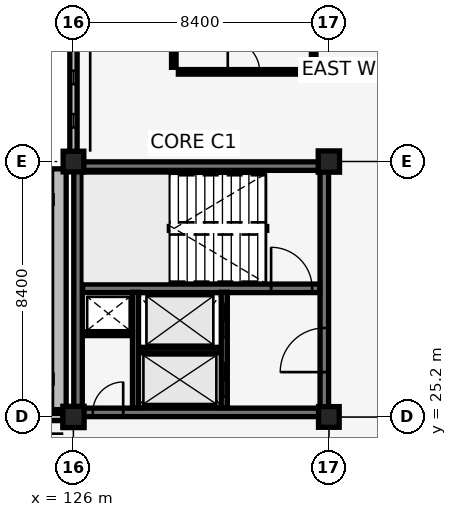
"""IFC4 building model, lengths in metres.
Left out: names, types, materials, properties, quantities, classifications, styles, units other than length and angle.
Written with IfcOpenShell. Run it as: python <this file> out.ifc"""

import sys

from ifc_helpers import new_model, si_unit, direction, frame, frame_2d, origin, origin_2d, place, context, subcontext, project, spatial, rectangle, extrude, element, fill, save


model = new_model("IFC4")
c1 = context("Model", 3, precision=1e-05, world=origin(), true_north=direction((0.0, 1.0)))
c2 = subcontext(c1, "Body", "Model", "MODEL_VIEW")
j1 = project(units=[si_unit("LENGTHUNIT", "METRE"), si_unit("PLANEANGLEUNIT", "RADIAN")], contexts=[c1])
p1 = place(None, origin())
s1 = spatial("IfcSite", under=j1, at=p1, CompositionType="ELEMENT")
p2 = place(p1, origin())
s2 = spatial("IfcBuilding", under=s1, at=p2, CompositionType="ELEMENT")
p3 = place(p2, frame((0.0, 0.0, 9.86)))
s3 = spatial("IfcBuildingStorey", under=s2, at=p3, CompositionType="ELEMENT", Elevation=9.86)
p4 = place(p3, frame((126.15, 25.35, 0.0), z_axis=(0.0, 0.0, 1.0), x_axis=(1.0, 0.0, 0.0)))
e1 = element("IfcWall", 1, at=p4, inside=s3, PredefinedType="SHEAR", context=c2, shape_type="SweptSolid", body=[
    extrude(rectangle(XDim=8.1, YDim=0.28, at=frame_2d((4.05, 0.0))), origin(), (0.0, 0.0, 1.0), 3.78),
])
p5 = place(p4, frame((0.485, 0.0, 0.0)))
e2 = element("IfcOpeningElement", 2, at=p5, cuts=e1, PredefinedType="OPENING", context=c2, shape_type="SweptSolid", body=[
    extrude(rectangle(XDim=1.0, YDim=2.15, at=frame_2d((0.5, 1.075))), frame((0.0, 0.15, 0.0), z_axis=(0.0, -1.0, 0.0), x_axis=(1.0, 0.0, 0.0)), (0.0, 0.0, 1.0), 0.3),
])
p6 = place(p3, frame((126.15, 33.45, 0.0), z_axis=(0.0, 0.0, 1.0), x_axis=(1.0, 0.0, 0.0)))
e3 = element("IfcWall", 3, at=p6, inside=s3, PredefinedType="SHEAR", context=c2, shape_type="SweptSolid", body=[
    extrude(rectangle(XDim=8.1, YDim=0.28, at=frame_2d((4.05, 0.0))), origin(), (0.0, 0.0, 1.0), 3.78),
])
p7 = place(p3, frame((126.15, 25.35, 0.0), z_axis=(0.0, 0.0, 1.0), x_axis=(0.0, 1.0, 0.0)))
e4 = element("IfcWall", 4, at=p7, inside=s3, PredefinedType="SHEAR", context=c2, shape_type="SweptSolid", body=[
    extrude(rectangle(XDim=8.1, YDim=0.28, at=frame_2d((4.05, 0.0))), origin(), (0.0, 0.0, 1.0), 3.78),
])
p8 = place(p3, frame((134.25, 25.35, 0.0), z_axis=(0.0, 0.0, 1.0), x_axis=(0.0, 1.0, 0.0)))
e5 = element("IfcWall", 5, at=p8, inside=s3, PredefinedType="SHEAR", context=c2, shape_type="SweptSolid", body=[
    extrude(rectangle(XDim=8.1, YDim=0.28, at=frame_2d((4.05, 0.0))), origin(), (0.0, 0.0, 1.0), 3.78),
])
p9 = place(p8, frame((1.325, 0.0, 0.0)))
e6 = element("IfcOpeningElement", 6, at=p9, cuts=e5, PredefinedType="OPENING", context=c2, shape_type="SweptSolid", body=[
    extrude(rectangle(XDim=1.45, YDim=2.15, at=frame_2d((0.725, 1.075))), frame((0.0, 0.15, 0.0), z_axis=(0.0, -1.0, 0.0), x_axis=(1.0, 0.0, 0.0)), (0.0, 0.0, 1.0), 0.3),
])
p10 = place(p3, frame((126.3, 29.43, 0.0), z_axis=(0.0, 0.0, 1.0), x_axis=(1.0, 0.0, 0.0)))
e7 = element("IfcWall", 7, at=p10, inside=s3, PredefinedType="SHEAR", context=c2, shape_type="SweptSolid", body=[
    extrude(rectangle(XDim=7.8, YDim=0.28, at=frame_2d((3.9, 0.0))), origin(), (0.0, 0.0, 1.0), 3.78),
])
p11 = place(p10, frame((6.2, 0.0, 0.0)))
e8 = element("IfcOpeningElement", 8, at=p11, cuts=e7, PredefinedType="OPENING", context=c2, shape_type="SweptSolid", body=[
    extrude(rectangle(XDim=1.35, YDim=2.15, at=frame_2d((0.675, 1.075))), frame((0.0, 0.15, 0.0), z_axis=(0.0, -1.0, 0.0), x_axis=(1.0, 0.0, 0.0)), (0.0, 0.0, 1.0), 0.3),
])
p12 = place(p3, frame((126.0, 25.2, 0.0), z_axis=(0.0, 0.0, 1.0), x_axis=(1.0, 0.0, 0.0)))
e9 = element("IfcColumn", 9, at=p12, inside=s3, PredefinedType="COLUMN", context=c2, shape_type="SweptSolid", body=[
    extrude(rectangle(XDim=0.7, YDim=0.7, at=origin_2d()), origin(), (0.0, 0.0, 1.0), 3.78),
])
for number, where, z_axis, x_axis in (
    (10, (126.0, 33.6, 0.0), (0.0, 0.0, 1.0), (1.0, 0.0, 0.0)),
    (11, (134.4, 25.2, 0.0), (0.0, 0.0, 1.0), (1.0, 0.0, 0.0)),
):
    element("IfcColumn", number, at=place(p3, frame(where, z_axis=z_axis, x_axis=x_axis)), inside=s3, PredefinedType="COLUMN", context=c2, shape_type="SweptSolid", body=[
        extrude(rectangle(XDim=0.68, YDim=0.68, at=origin_2d()), origin(), (0.0, 0.0, 1.0), 3.78),
    ])
p13 = place(p3, frame((134.4, 33.6, 0.0), z_axis=(0.0, 0.0, 1.0), x_axis=(1.0, 0.0, 0.0)))
e12 = element("IfcColumn", 12, at=p13, inside=s3, PredefinedType="COLUMN", context=c2, shape_type="SweptSolid", body=[
    extrude(rectangle(XDim=0.7, YDim=0.7, at=origin_2d()), origin(), (0.0, 0.0, 1.0), 3.78),
])
p14 = place(p3, frame((117.785, 25.2, 0.0), z_axis=(0.0, 0.0, 1.0), x_axis=(1.0, 0.0, 0.0)))
e13 = element("IfcWall", 13, at=p14, inside=s3, PredefinedType="SOLIDWALL", context=c2, shape_type="SweptSolid", body=[
    extrude(rectangle(XDim=7.88, YDim=0.24, at=frame_2d((3.94, 0.0))), origin(), (0.0, 0.0, 1.0), 3.01),
])
p15 = place(p14, frame((0.808, 0.0, 0.35)))
e14 = element("IfcOpeningElement", 14, at=p15, cuts=e13, PredefinedType="OPENING", context=c2, shape_type="SweptSolid", body=[
    extrude(rectangle(XDim=0.44, YDim=1.25, at=frame_2d((0.22, 0.625))), frame((0.0, 0.13, 0.0), z_axis=(0.0, -1.0, 0.0), x_axis=(1.0, 0.0, 0.0)), (0.0, 0.0, 1.0), 0.26),
])
p16 = place(p14, frame((2.264, 0.0, 0.35)))
e15 = element("IfcOpeningElement", 15, at=p16, cuts=e13, PredefinedType="OPENING", context=c2, shape_type="SweptSolid", body=[
    extrude(rectangle(XDim=0.44, YDim=1.25, at=frame_2d((0.22, 0.625))), frame((0.0, 0.13, 0.0), z_axis=(0.0, -1.0, 0.0), x_axis=(1.0, 0.0, 0.0)), (0.0, 0.0, 1.0), 0.26),
])
p17 = place(p14, frame((3.72, 0.0, 0.35)))
e16 = element("IfcOpeningElement", 16, at=p17, cuts=e13, PredefinedType="OPENING", context=c2, shape_type="SweptSolid", body=[
    extrude(rectangle(XDim=0.44, YDim=1.25, at=frame_2d((0.22, 0.625))), frame((0.0, 0.13, 0.0), z_axis=(0.0, -1.0, 0.0), x_axis=(1.0, 0.0, 0.0)), (0.0, 0.0, 1.0), 0.26),
])
p18 = place(p14, frame((5.176, 0.0, 0.35)))
e17 = element("IfcOpeningElement", 17, at=p18, cuts=e13, PredefinedType="OPENING", context=c2, shape_type="SweptSolid", body=[
    extrude(rectangle(XDim=0.44, YDim=1.25, at=frame_2d((0.22, 0.625))), frame((0.0, 0.13, 0.0), z_axis=(0.0, -1.0, 0.0), x_axis=(1.0, 0.0, 0.0)), (0.0, 0.0, 1.0), 0.26),
])
p19 = place(p14, frame((6.632, 0.0, 0.35)))
e18 = element("IfcOpeningElement", 18, at=p19, cuts=e13, PredefinedType="OPENING", context=c2, shape_type="SweptSolid", body=[
    extrude(rectangle(XDim=0.44, YDim=1.25, at=frame_2d((0.22, 0.625))), frame((0.0, 0.13, 0.0), z_axis=(0.0, -1.0, 0.0), x_axis=(1.0, 0.0, 0.0)), (0.0, 0.0, 1.0), 0.26),
])
p20 = place(p3, frame((125.52, 25.44, 0.0), z_axis=(0.0, 0.0, 1.0), x_axis=(0.0, 1.0, 0.0)))
e19 = element("IfcWall", 19, at=p20, inside=s3, PredefinedType="SOLIDWALL", context=c2, shape_type="SweptSolid", body=[
    extrude(rectangle(XDim=7.92, YDim=0.48, at=frame_2d((3.96, 0.0))), origin(), (0.0, 0.0, 1.0), 4.08),
])
p21 = place(p3, frame((126.0, 33.925, 0.0), z_axis=(0.0, 0.0, 1.0), x_axis=(0.0, 1.0, 0.0)))
e20 = element("IfcWall", 20, at=p21, inside=s3, PredefinedType="SOLIDWALL", context=c2, shape_type="SweptSolid", body=[
    extrude(rectangle(XDim=7.74, YDim=0.24, at=frame_2d((3.87, 0.0))), origin(), (0.0, 0.0, 1.0), 3.0),
])
p22 = place(p21, frame((0.794, 0.0, 0.35)))
e21 = element("IfcOpeningElement", 21, at=p22, cuts=e20, PredefinedType="OPENING", context=c2, shape_type="SweptSolid", body=[
    extrude(rectangle(XDim=0.44, YDim=1.25, at=frame_2d((0.22, 0.625))), frame((0.0, 0.13, 0.0), z_axis=(0.0, -1.0, 0.0), x_axis=(1.0, 0.0, 0.0)), (0.0, 0.0, 1.0), 0.26),
])
p23 = place(p21, frame((2.222, 0.0, 0.35)))
e22 = element("IfcOpeningElement", 22, at=p23, cuts=e20, PredefinedType="OPENING", context=c2, shape_type="SweptSolid", body=[
    extrude(rectangle(XDim=0.44, YDim=1.25, at=frame_2d((0.22, 0.625))), frame((0.0, 0.13, 0.0), z_axis=(0.0, -1.0, 0.0), x_axis=(1.0, 0.0, 0.0)), (0.0, 0.0, 1.0), 0.26),
])
p24 = place(p21, frame((3.65, 0.0, 0.35)))
e23 = element("IfcOpeningElement", 23, at=p24, cuts=e20, PredefinedType="OPENING", context=c2, shape_type="SweptSolid", body=[
    extrude(rectangle(XDim=0.44, YDim=1.25, at=frame_2d((0.22, 0.625))), frame((0.0, 0.13, 0.0), z_axis=(0.0, -1.0, 0.0), x_axis=(1.0, 0.0, 0.0)), (0.0, 0.0, 1.0), 0.26),
])
p25 = place(p21, frame((5.078, 0.0, 0.35)))
e24 = element("IfcOpeningElement", 24, at=p25, cuts=e20, PredefinedType="OPENING", context=c2, shape_type="SweptSolid", body=[
    extrude(rectangle(XDim=0.44, YDim=1.25, at=frame_2d((0.22, 0.625))), frame((0.0, 0.13, 0.0), z_axis=(0.0, -1.0, 0.0), x_axis=(1.0, 0.0, 0.0)), (0.0, 0.0, 1.0), 0.26),
])
p26 = place(p21, frame((6.506, 0.0, 0.35)))
e25 = element("IfcOpeningElement", 25, at=p26, cuts=e20, PredefinedType="OPENING", context=c2, shape_type="SweptSolid", body=[
    extrude(rectangle(XDim=0.44, YDim=1.25, at=frame_2d((0.22, 0.625))), frame((0.0, 0.13, 0.0), z_axis=(0.0, -1.0, 0.0), x_axis=(1.0, 0.0, 0.0)), (0.0, 0.0, 1.0), 0.26),
])
p27 = place(p3, frame((130.96, 25.5, 0.0), z_axis=(0.0, 0.0, 1.0), x_axis=(0.0, 1.0, 0.0)))
e26 = element("IfcWall", 26, at=p27, inside=s3, PredefinedType="SHEAR", context=c2, shape_type="SweptSolid", body=[
    extrude(rectangle(XDim=3.8, YDim=0.2, at=frame_2d((1.9, 0.0))), origin(), (0.0, 0.0, 1.0), 2.95),
])
p28 = place(p27, frame((0.375, 0.0, 0.0)))
e27 = element("IfcOpeningElement", 27, at=p28, cuts=e26, PredefinedType="OPENING", context=c2, shape_type="SweptSolid", body=[
    extrude(rectangle(XDim=1.1, YDim=2.15, at=frame_2d((0.55, 1.075))), frame((0.0, 0.11, 0.0), z_axis=(0.0, -1.0, 0.0), x_axis=(1.0, 0.0, 0.0)), (0.0, 0.0, 1.0), 0.22),
])
p29 = place(p27, frame((2.325, 0.0, 0.0)))
e28 = element("IfcOpeningElement", 28, at=p29, cuts=e26, PredefinedType="OPENING", context=c2, shape_type="SweptSolid", body=[
    extrude(rectangle(XDim=1.1, YDim=2.15, at=frame_2d((0.55, 1.075))), frame((0.0, 0.11, 0.0), z_axis=(0.0, -1.0, 0.0), x_axis=(1.0, 0.0, 0.0)), (0.0, 0.0, 1.0), 0.22),
])
p30 = place(p3, frame((128.04, 25.5, 0.0), z_axis=(0.0, 0.0, 1.0), x_axis=(0.0, 1.0, 0.0)))
e29 = element("IfcWall", 29, at=p30, inside=s3, PredefinedType="SHEAR", context=c2, shape_type="SweptSolid", body=[
    extrude(rectangle(XDim=3.8, YDim=0.2, at=frame_2d((1.9, 0.0))), origin(), (0.0, 0.0, 1.0), 2.95),
])
p31 = place(p3, frame((128.15, 27.4, 0.0), z_axis=(0.0, 0.0, 1.0), x_axis=(1.0, 0.0, 0.0)))
e30 = element("IfcWall", 30, at=p31, inside=s3, PredefinedType="SHEAR", context=c2, shape_type="SweptSolid", body=[
    extrude(rectangle(XDim=2.7, YDim=0.18, at=frame_2d((1.35, 0.0))), origin(), (0.0, 0.0, 1.0), 3.78),
])
p32 = place(p3, frame((126.32, 27.94, 0.0), z_axis=(0.0, 0.0, 1.0), x_axis=(1.0, 0.0, 0.0)))
e31 = element("IfcWall", 31, at=p32, inside=s3, PredefinedType="PARTITIONING", context=c2, shape_type="SweptSolid", body=[
    extrude(rectangle(XDim=1.62, YDim=0.13, at=frame_2d((0.81, 0.0))), origin(), (0.0, 0.0, 1.0), 3.0),
])
p33 = place(p3, frame((129.45, 36.55, 0.0), z_axis=(0.0, 0.0, 1.0), x_axis=(1.0, 0.0, 0.0)))
e32 = element("IfcWall", 32, at=p33, inside=s3, PredefinedType="PARTITIONING", context=c2, shape_type="SweptSolid", body=[
    extrude(rectangle(XDim=4.3, YDim=0.15, at=frame_2d((2.15, 0.0))), origin(), (0.0, 0.0, 1.0), 3.78),
])
p34 = place(p33, frame((1.625, 0.0, 0.0)))
e33 = element("IfcOpeningElement", 33, at=p34, cuts=e32, PredefinedType="OPENING", context=c2, shape_type="SweptSolid", body=[
    extrude(rectangle(XDim=1.05, YDim=2.15, at=frame_2d((0.525, 1.075))), frame((0.0, 0.085, 0.0), z_axis=(0.0, -1.0, 0.0), x_axis=(1.0, 0.0, 0.0)), (0.0, 0.0, 1.0), 0.17),
])
for number, where, z_axis, x_axis in (
    (34, (129.3, 36.7, 0.0), (0.0, 0.0, 1.0), (0.0, 1.0, 0.0)),
    (35, (133.9, 36.7, 0.0), (0.0, 0.0, 1.0), (0.0, 1.0, 0.0)),
):
    element("IfcWall", number, at=place(p3, frame(where, z_axis=z_axis, x_axis=x_axis)), inside=s3, PredefinedType="PARTITIONING", context=c2, shape_type="SweptSolid", body=[
        extrude(rectangle(XDim=47.27, YDim=0.15, at=frame_2d((23.635, 0.0))), origin(), (0.0, 0.0, 1.0), 2.91),
    ])
p35 = place(p22, origin())
e36 = element("IfcWindow", 36, at=p35, inside=s3, PartitioningType="SINGLE_PANEL", PredefinedType="WINDOW", context=c2, shape_type="SweptSolid", body=[
    extrude(rectangle(XDim=0.44, YDim=1.25, at=frame_2d((0.22, 0.625))), frame((0.0, 0.03, 0.0), z_axis=(0.0, -1.0, 0.0), x_axis=(1.0, 0.0, 0.0)), (0.0, 0.0, 1.0), 0.06),
])
fill(e21, e36)
p36 = place(p23, origin())
e37 = element("IfcWindow", 37, at=p36, inside=s3, PartitioningType="SINGLE_PANEL", PredefinedType="WINDOW", context=c2, shape_type="SweptSolid", body=[
    extrude(rectangle(XDim=0.44, YDim=1.25, at=frame_2d((0.22, 0.625))), frame((0.0, 0.03, 0.0), z_axis=(0.0, -1.0, 0.0), x_axis=(1.0, 0.0, 0.0)), (0.0, 0.0, 1.0), 0.06),
])
fill(e22, e37)
p37 = place(p11, origin())
e38 = element("IfcDoor", 38, at=p37, inside=s3, OperationType="SINGLE_SWING_LEFT", PredefinedType="DOOR", context=c2, shape_type="SweptSolid", body=[
    extrude(rectangle(XDim=1.35, YDim=2.15, at=frame_2d((0.675, 1.075))), frame((0.0, 0.025, 0.0), z_axis=(0.0, -1.0, 0.0), x_axis=(1.0, 0.0, 0.0)), (0.0, 0.0, 1.0), 0.05),
])
fill(e8, e38)
p38 = place(p28, origin())
e39 = element("IfcDoor", 39, at=p38, inside=s3, OperationType="SLIDING_TO_LEFT", PredefinedType="DOOR", context=c2, shape_type="SweptSolid", body=[
    extrude(rectangle(XDim=1.1, YDim=2.15, at=frame_2d((0.55, 1.075))), frame((0.0, 0.025, 0.0), z_axis=(0.0, -1.0, 0.0), x_axis=(1.0, 0.0, 0.0)), (0.0, 0.0, 1.0), 0.05),
])
fill(e27, e39)
p39 = place(p29, origin())
e40 = element("IfcDoor", 40, at=p39, inside=s3, OperationType="SLIDING_TO_LEFT", PredefinedType="DOOR", context=c2, shape_type="SweptSolid", body=[
    extrude(rectangle(XDim=1.1, YDim=2.15, at=frame_2d((0.55, 1.075))), frame((0.0, 0.025, 0.0), z_axis=(0.0, -1.0, 0.0), x_axis=(1.0, 0.0, 0.0)), (0.0, 0.0, 1.0), 0.05),
])
fill(e28, e40)
p40 = place(p9, origin())
e41 = element("IfcDoor", 41, at=p40, inside=s3, OperationType="DOUBLE_DOOR_SINGLE_SWING", PredefinedType="DOOR", context=c2, shape_type="SweptSolid", body=[
    extrude(rectangle(XDim=1.45, YDim=2.15, at=frame_2d((0.725, 1.075))), frame((0.0, 0.025, 0.0), z_axis=(0.0, -1.0, 0.0), x_axis=(1.0, 0.0, 0.0)), (0.0, 0.0, 1.0), 0.05),
])
fill(e6, e41)
p41 = place(p5, origin())
e42 = element("IfcDoor", 42, at=p41, inside=s3, OperationType="SINGLE_SWING_RIGHT", PredefinedType="DOOR", context=c2, shape_type="SweptSolid", body=[
    extrude(rectangle(XDim=1.0, YDim=2.15, at=frame_2d((0.5, 1.075))), frame((0.0, 0.025, 0.0), z_axis=(0.0, -1.0, 0.0), x_axis=(1.0, 0.0, 0.0)), (0.0, 0.0, 1.0), 0.05),
])
fill(e2, e42)
p42 = place(p34, origin())
e43 = element("IfcDoor", 43, at=p42, inside=s3, OperationType="SINGLE_SWING_LEFT", PredefinedType="DOOR", context=c2, shape_type="SweptSolid", body=[
    extrude(rectangle(XDim=1.05, YDim=2.15, at=frame_2d((0.525, 1.075))), frame((0.0, 0.025, 0.0), z_axis=(0.0, -1.0, 0.0), x_axis=(1.0, 0.0, 0.0)), (0.0, 0.0, 1.0), 0.05),
])
fill(e33, e43)
save(model, sys.argv[1])
